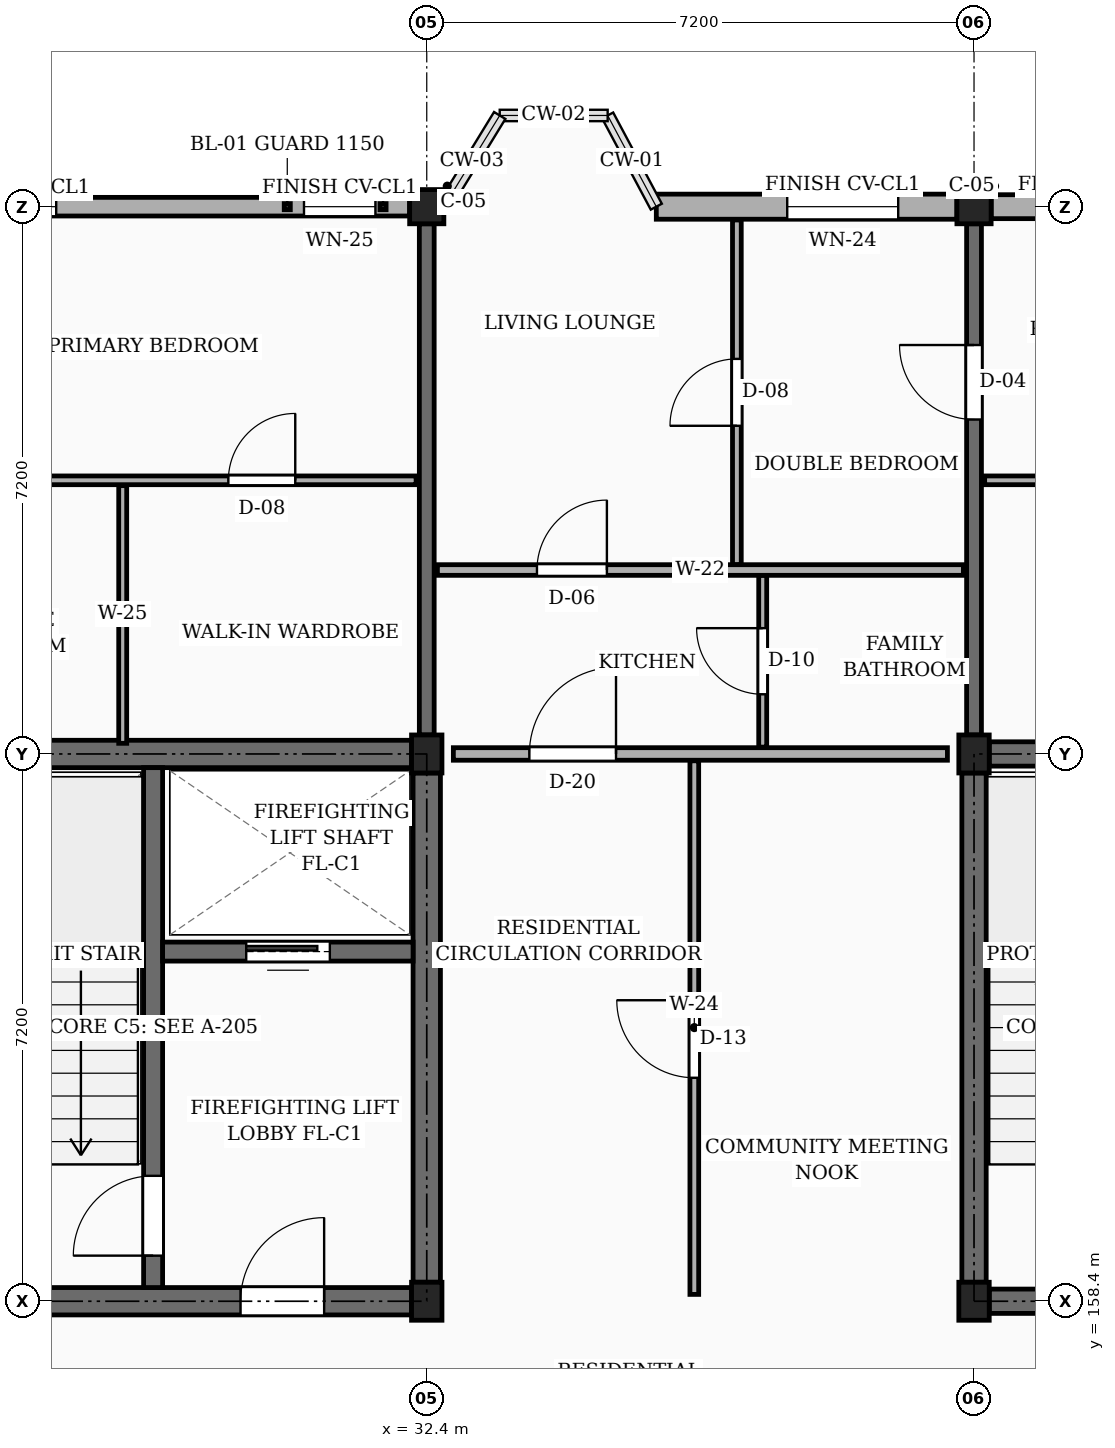
"""IFC4 building model, lengths in metres.
Left out: names, types, materials, properties, quantities, classifications, styles, units other than length and angle.
Written with IfcOpenShell. Run it as: python <this file> out.ifc"""

import sys

from ifc_helpers import new_model, si_unit, direction, frame, frame_2d, origin, origin_2d, place, context, subcontext, project, spatial, rectangle, extrude, element, fill, save


model = new_model("IFC4")
c1 = context("Model", 3, precision=1e-05, world=origin(), true_north=direction((0.0, 1.0)))
c2 = subcontext(c1, "Body", "Model", "MODEL_VIEW")
j1 = project(units=[si_unit("LENGTHUNIT", "METRE"), si_unit("PLANEANGLEUNIT", "RADIAN")], contexts=[c1])
p1 = place(None, origin())
s1 = spatial("IfcSite", under=j1, at=p1, CompositionType="ELEMENT")
p2 = place(p1, origin())
s2 = spatial("IfcBuilding", under=s1, at=p2, CompositionType="ELEMENT")
p3 = place(p2, frame((0.0, 0.0, 39.15)))
s3 = spatial("IfcBuildingStorey", under=s2, at=p3, CompositionType="ELEMENT", Elevation=39.15)
for number, where, z_axis, x_axis in (
    (1, (32.4, 158.4, 0.0), (0.0, 0.0, 1.0), (1.0, 0.0, 0.0)),
    (2, (32.4, 165.6, 0.0), (0.0, 0.0, 1.0), (1.0, 0.0, 0.0)),
):
    element("IfcColumn", number, at=place(p3, frame(where, z_axis=z_axis, x_axis=x_axis)), inside=s3, PredefinedType="COLUMN", context=c2, shape_type="SweptSolid", body=[
        extrude(rectangle(XDim=0.4, YDim=0.5, at=origin_2d()), origin(), (0.0, 0.0, 1.0), 3.15),
    ])
p4 = place(p3, frame((32.4, 172.8, 0.0), z_axis=(0.0, 0.0, 1.0), x_axis=(1.0, 0.0, 0.0)))
e3 = element("IfcColumn", 3, at=p4, inside=s3, PredefinedType="COLUMN", context=c2, shape_type="SweptSolid", body=[
    extrude(rectangle(XDim=0.45, YDim=0.45, at=origin_2d()), origin(), (0.0, 0.0, 1.0), 3.15),
])
for number, where, z_axis, x_axis in (
    (4, (39.6, 158.4, 0.0), (0.0, 0.0, 1.0), (1.0, 0.0, 0.0)),
    (5, (39.6, 165.6, 0.0), (0.0, 0.0, 1.0), (1.0, 0.0, 0.0)),
):
    element("IfcColumn", number, at=place(p3, frame(where, z_axis=z_axis, x_axis=x_axis)), inside=s3, PredefinedType="COLUMN", context=c2, shape_type="SweptSolid", body=[
        extrude(rectangle(XDim=0.4, YDim=0.5, at=origin_2d()), origin(), (0.0, 0.0, 1.0), 3.15),
    ])
p5 = place(p3, frame((39.6, 172.8, 0.0), z_axis=(0.0, 0.0, 1.0), x_axis=(1.0, 0.0, 0.0)))
e6 = element("IfcColumn", 6, at=p5, inside=s3, PredefinedType="COLUMN", context=c2, shape_type="SweptSolid", body=[
    extrude(rectangle(XDim=0.45, YDim=0.45, at=origin_2d()), origin(), (0.0, 0.0, 1.0), 3.15),
])
p6 = place(p3, frame((32.4, 165.85, 0.0), z_axis=(0.0, 0.0, 1.0), x_axis=(0.0, 1.0, 0.0)))
e7 = element("IfcWall", 7, at=p6, inside=s3, PredefinedType="SOLIDWALL", context=c2, shape_type="SweptSolid", body=[
    extrude(rectangle(XDim=6.725, YDim=0.195, at=frame_2d((3.362, 0.0))), origin(), (0.0, 0.0, 1.0), 2.185),
])
p7 = place(p3, frame((39.6, 165.85, 0.0), z_axis=(0.0, 0.0, 1.0), x_axis=(0.0, 1.0, 0.0)))
e8 = element("IfcWall", 8, at=p7, inside=s3, PredefinedType="SOLIDWALL", context=c2, shape_type="SweptSolid", body=[
    extrude(rectangle(XDim=6.725, YDim=0.195, at=frame_2d((3.362, 0.0))), origin(), (0.0, 0.0, 1.0), 2.185),
])
p8 = place(p7, frame((4.15, 0.0, 0.0)))
e9 = element("IfcOpeningElement", 9, at=p8, cuts=e8, PredefinedType="OPENING", context=c2, shape_type="SweptSolid", body=[
    extrude(rectangle(XDim=0.98, YDim=2.12, at=frame_2d((0.49, 1.06))), frame((0.0, 0.107, 0.0), z_axis=(0.0, -1.0, 0.0), x_axis=(1.0, 0.0, 0.0)), (0.0, 0.0, 1.0), 0.215),
])
p9 = place(p3, frame((46.575, 172.8, 0.0), z_axis=(0.0, 0.0, 1.0), x_axis=(-1.0, 0.0, 0.0)))
e10 = element("IfcWall", 10, at=p9, inside=s3, PredefinedType="SOLIDWALL", context=c2, shape_type="SweptSolid", body=[
    extrude(rectangle(XDim=6.75, YDim=0.315, at=frame_2d((3.375, 0.0))), origin(), (0.0, 0.0, 1.0), 2.455),
])
p10 = place(p9, frame((0.45, 0.0, 0.78)))
e11 = element("IfcOpeningElement", 11, at=p10, cuts=e10, PredefinedType="OPENING", context=c2, shape_type="SweptSolid", body=[
    extrude(rectangle(XDim=1.3, YDim=1.36, at=frame_2d((0.65, 0.68))), frame((0.0, 0.167, 0.0), z_axis=(0.0, -1.0, 0.0), x_axis=(1.0, 0.0, 0.0)), (0.0, 0.0, 1.0), 0.335),
])
p11 = place(p9, frame((4.65, 0.0, 0.78)))
e12 = element("IfcOpeningElement", 12, at=p11, cuts=e10, PredefinedType="OPENING", context=c2, shape_type="SweptSolid", body=[
    extrude(rectangle(XDim=1.46, YDim=1.36, at=frame_2d((0.73, 0.68))), frame((0.0, 0.167, 0.0), z_axis=(0.0, -1.0, 0.0), x_axis=(1.0, 0.0, 0.0)), (0.0, 0.0, 1.0), 0.335),
])
p12 = place(p3, frame((39.375, 172.8, 0.0), z_axis=(0.0, 0.0, 1.0), x_axis=(-1.0, 0.0, 0.0)))
e13 = element("IfcWall", 13, at=p12, inside=s3, PredefinedType="SOLIDWALL", context=c2, shape_type="SweptSolid", body=[
    extrude(rectangle(XDim=3.955, YDim=0.33, at=frame_2d((1.978, 0.0))), origin(), (0.0, 0.0, 1.0), 2.455),
])
p13 = place(p12, frame((0.772, 0.0, 0.78)))
e14 = element("IfcOpeningElement", 14, at=p13, cuts=e13, PredefinedType="OPENING", context=c2, shape_type="SweptSolid", body=[
    extrude(rectangle(XDim=1.46, YDim=1.36, at=frame_2d((0.73, 0.68))), frame((0.0, 0.175, 0.0), z_axis=(0.0, -1.0, 0.0), x_axis=(1.0, 0.0, 0.0)), (0.0, 0.0, 1.0), 0.35),
])
p14 = place(p3, frame((32.175, 172.8, 0.0), z_axis=(0.0, 0.0, 1.0), x_axis=(-1.0, 0.0, 0.0)))
e15 = element("IfcWall", 15, at=p14, inside=s3, PredefinedType="SOLIDWALL", context=c2, shape_type="SweptSolid", body=[
    extrude(rectangle(XDim=6.75, YDim=0.245, at=frame_2d((3.375, 0.0))), origin(), (0.0, 0.0, 1.0), 2.455),
])
p15 = place(p14, frame((0.45, 0.0, 0.78)))
e16 = element("IfcOpeningElement", 16, at=p15, cuts=e15, PredefinedType="OPENING", context=c2, shape_type="SweptSolid", body=[
    extrude(rectangle(XDim=0.94, YDim=1.44, at=frame_2d((0.47, 0.72))), frame((0.0, 0.133, 0.0), z_axis=(0.0, -1.0, 0.0), x_axis=(1.0, 0.0, 0.0)), (0.0, 0.0, 1.0), 0.265),
])
p16 = place(p14, frame((4.65, 0.0, 0.78)))
e17 = element("IfcOpeningElement", 17, at=p16, cuts=e15, PredefinedType="OPENING", context=c2, shape_type="SweptSolid", body=[
    extrude(rectangle(XDim=1.15, YDim=1.44, at=frame_2d((0.575, 0.72))), frame((0.0, 0.133, 0.0), z_axis=(0.0, -1.0, 0.0), x_axis=(1.0, 0.0, 0.0)), (0.0, 0.0, 1.0), 0.265),
])
p17 = place(p3, frame((25.4, 165.6, 0.0), z_axis=(0.0, 0.0, 1.0), x_axis=(1.0, 0.0, 0.0)))
e18 = element("IfcWall", 18, at=p17, inside=s3, PredefinedType="SHEAR", context=c2, shape_type="SweptSolid", body=[
    extrude(rectangle(XDim=6.8, YDim=0.36, at=frame_2d((3.4, 0.0))), origin(), (0.0, 0.0, 1.0), 2.885),
])
p18 = place(p3, frame((32.4, 158.65, 0.0), z_axis=(0.0, 0.0, 1.0), x_axis=(0.0, 1.0, 0.0)))
e19 = element("IfcWall", 19, at=p18, inside=s3, PredefinedType="SHEAR", context=c2, shape_type="SweptSolid", body=[
    extrude(rectangle(XDim=6.7, YDim=0.36, at=frame_2d((3.35, 0.0))), origin(), (0.0, 0.0, 1.0), 2.885),
])
p19 = place(p3, frame((25.4, 158.4, 0.0), z_axis=(0.0, 0.0, 1.0), x_axis=(1.0, 0.0, 0.0)))
e20 = element("IfcWall", 20, at=p19, inside=s3, PredefinedType="SHEAR", context=c2, shape_type="SweptSolid", body=[
    extrude(rectangle(XDim=6.8, YDim=0.36, at=frame_2d((3.4, 0.0))), origin(), (0.0, 0.0, 1.0), 2.885),
])
p20 = place(p19, frame((4.55, 0.0, 0.0)))
e21 = element("IfcOpeningElement", 21, at=p20, cuts=e20, PredefinedType="OPENING", context=c2, shape_type="SweptSolid", body=[
    extrude(rectangle(XDim=1.1, YDim=2.15, at=frame_2d((0.55, 1.075))), frame((0.0, 0.19, 0.0), z_axis=(0.0, -1.0, 0.0), x_axis=(1.0, 0.0, 0.0)), (0.0, 0.0, 1.0), 0.38),
])
p21 = place(p3, frame((28.8, 158.58, 0.0), z_axis=(0.0, 0.0, 1.0), x_axis=(0.0, 1.0, 0.0)))
e22 = element("IfcWall", 22, at=p21, inside=s3, PredefinedType="SHEAR", context=c2, shape_type="SweptSolid", body=[
    extrude(rectangle(XDim=6.84, YDim=0.25, at=frame_2d((3.42, 0.0))), origin(), (0.0, 0.0, 1.0), 2.885),
])
p22 = place(p21, frame((0.42, 0.0, 0.0)))
e23 = element("IfcOpeningElement", 23, at=p22, cuts=e22, PredefinedType="OPENING", context=c2, shape_type="SweptSolid", body=[
    extrude(rectangle(XDim=1.05, YDim=2.15, at=frame_2d((0.525, 1.075))), frame((0.0, 0.135, 0.0), z_axis=(0.0, -1.0, 0.0), x_axis=(1.0, 0.0, 0.0)), (0.0, 0.0, 1.0), 0.27),
])
p23 = place(p3, frame((28.925, 163.0, 0.0), z_axis=(0.0, 0.0, 1.0), x_axis=(1.0, 0.0, 0.0)))
e24 = element("IfcWall", 24, at=p23, inside=s3, PredefinedType="SHEAR", context=c2, shape_type="SweptSolid", body=[
    extrude(rectangle(XDim=3.295, YDim=0.25, at=frame_2d((1.647, 0.0))), origin(), (0.0, 0.0, 1.0), 2.885),
])
p24 = place(p23, frame((1.1, 0.0, 0.0)))
e25 = element("IfcOpeningElement", 25, at=p24, cuts=e24, PredefinedType="OPENING", context=c2, shape_type="SweptSolid", body=[
    extrude(rectangle(XDim=1.1, YDim=2.2, at=frame_2d((0.55, 1.1))), frame((0.0, 0.135, 0.0), z_axis=(0.0, -1.0, 0.0), x_axis=(1.0, 0.0, 0.0)), (0.0, 0.0, 1.0), 0.27),
])
p25 = place(p3, frame((39.6, 158.65, 0.0), z_axis=(0.0, 0.0, 1.0), x_axis=(0.0, 1.0, 0.0)))
e26 = element("IfcWall", 26, at=p25, inside=s3, PredefinedType="SHEAR", context=c2, shape_type="SweptSolid", body=[
    extrude(rectangle(XDim=6.7, YDim=0.32, at=frame_2d((3.35, 0.0))), origin(), (0.0, 0.0, 1.0), 2.885),
])
p26 = place(p3, frame((39.8, 165.6, 0.0), z_axis=(0.0, 0.0, 1.0), x_axis=(1.0, 0.0, 0.0)))
e27 = element("IfcWall", 27, at=p26, inside=s3, PredefinedType="SHEAR", context=c2, shape_type="SweptSolid", body=[
    extrude(rectangle(XDim=6.8, YDim=0.32, at=frame_2d((3.4, 0.0))), origin(), (0.0, 0.0, 1.0), 2.885),
])
p27 = place(p3, frame((39.8, 158.4, 0.0), z_axis=(0.0, 0.0, 1.0), x_axis=(1.0, 0.0, 0.0)))
e28 = element("IfcWall", 28, at=p27, inside=s3, PredefinedType="SHEAR", context=c2, shape_type="SweptSolid", body=[
    extrude(rectangle(XDim=6.8, YDim=0.32, at=frame_2d((3.4, 0.0))), origin(), (0.0, 0.0, 1.0), 2.885),
])
p28 = place(p27, frame((4.55, 0.0, 0.0)))
e29 = element("IfcOpeningElement", 29, at=p28, cuts=e28, PredefinedType="OPENING", context=c2, shape_type="SweptSolid", body=[
    extrude(rectangle(XDim=1.1, YDim=2.15, at=frame_2d((0.55, 1.075))), frame((0.0, 0.17, 0.0), z_axis=(0.0, -1.0, 0.0), x_axis=(1.0, 0.0, 0.0)), (0.0, 0.0, 1.0), 0.34),
])
p29 = place(p3, frame((32.75, 165.6, 0.0), z_axis=(0.0, 0.0, 1.0), x_axis=(1.0, 0.0, 0.0)))
e30 = element("IfcWall", 30, at=p29, inside=s3, PredefinedType="PARTITIONING", context=c2, shape_type="SweptSolid", body=[
    extrude(rectangle(XDim=6.5, YDim=0.165, at=frame_2d((3.25, 0.0))), origin(), (0.0, 0.0, 1.0), 2.32),
])
p30 = place(p29, frame((1.0, 0.0, 0.0)))
e31 = element("IfcOpeningElement", 31, at=p30, cuts=e30, PredefinedType="OPENING", context=c2, shape_type="SweptSolid", body=[
    extrude(rectangle(XDim=1.14, YDim=2.18, at=frame_2d((0.57, 1.09))), frame((0.0, 0.093, 0.0), z_axis=(0.0, -1.0, 0.0), x_axis=(1.0, 0.0, 0.0)), (0.0, 0.0, 1.0), 0.185),
])
p31 = place(p3, frame((25.34, 169.2, 0.0), z_axis=(0.0, 0.0, 1.0), x_axis=(1.0, 0.0, 0.0)))
e32 = element("IfcWall", 32, at=p31, inside=s3, PredefinedType="PARTITIONING", context=c2, shape_type="SweptSolid", body=[
    extrude(rectangle(XDim=6.92, YDim=0.115, at=frame_2d((3.46, 0.0))), origin(), (0.0, 0.0, 1.0), 2.32),
])
p32 = place(p31, frame((1.05, 0.0, 0.0)))
e33 = element("IfcOpeningElement", 33, at=p32, cuts=e32, PredefinedType="OPENING", context=c2, shape_type="SweptSolid", body=[
    extrude(rectangle(XDim=0.87, YDim=2.05, at=frame_2d((0.435, 1.025))), frame((0.0, 0.067, 0.0), z_axis=(0.0, -1.0, 0.0), x_axis=(1.0, 0.0, 0.0)), (0.0, 0.0, 1.0), 0.135),
])
p33 = place(p31, frame((4.45, 0.0, 0.0)))
e34 = element("IfcOpeningElement", 34, at=p33, cuts=e32, PredefinedType="OPENING", context=c2, shape_type="SweptSolid", body=[
    extrude(rectangle(XDim=0.88, YDim=2.08, at=frame_2d((0.44, 1.04))), frame((0.0, 0.067, 0.0), z_axis=(0.0, -1.0, 0.0), x_axis=(1.0, 0.0, 0.0)), (0.0, 0.0, 1.0), 0.135),
])
p34 = place(p3, frame((28.4, 165.74, 0.0), z_axis=(0.0, 0.0, 1.0), x_axis=(0.0, 1.0, 0.0)))
e35 = element("IfcWall", 35, at=p34, inside=s3, PredefinedType="PARTITIONING", context=c2, shape_type="SweptSolid", body=[
    extrude(rectangle(XDim=3.39, YDim=0.105, at=frame_2d((1.695, 0.0))), origin(), (0.0, 0.0, 1.0), 2.32),
])
p35 = place(p3, frame((35.92, 158.49, 0.0), z_axis=(0.0, 0.0, 1.0), x_axis=(0.0, 1.0, 0.0)))
e36 = element("IfcWall", 36, at=p35, inside=s3, PredefinedType="PARTITIONING", context=c2, shape_type="SweptSolid", body=[
    extrude(rectangle(XDim=7.02, YDim=0.115, at=frame_2d((3.51, 0.0))), origin(), (0.0, 0.0, 1.0), 2.32),
])
p36 = place(p35, frame((2.85, 0.0, 0.0)))
e37 = element("IfcOpeningElement", 37, at=p36, cuts=e36, PredefinedType="OPENING", context=c2, shape_type="SweptSolid", body=[
    extrude(rectangle(XDim=1.02, YDim=2.15, at=frame_2d((0.51, 1.075))), frame((0.0, 0.067, 0.0), z_axis=(0.0, -1.0, 0.0), x_axis=(1.0, 0.0, 0.0)), (0.0, 0.0, 1.0), 0.135),
])
p37 = place(p3, frame((36.48, 168.09, 0.0), z_axis=(0.0, 0.0, 1.0), x_axis=(0.0, 1.0, 0.0)))
e38 = element("IfcWall", 38, at=p37, inside=s3, PredefinedType="PARTITIONING", context=c2, shape_type="SweptSolid", body=[
    extrude(rectangle(XDim=4.535, YDim=0.115, at=frame_2d((2.268, 0.0))), origin(), (0.0, 0.0, 1.0), 2.32),
])
p38 = place(p37, frame((1.827, 0.0, 0.0)))
e39 = element("IfcOpeningElement", 39, at=p38, cuts=e38, PredefinedType="OPENING", context=c2, shape_type="SweptSolid", body=[
    extrude(rectangle(XDim=0.88, YDim=2.08, at=frame_2d((0.44, 1.04))), frame((0.0, 0.067, 0.0), z_axis=(0.0, -1.0, 0.0), x_axis=(1.0, 0.0, 0.0)), (0.0, 0.0, 1.0), 0.135),
])
p39 = place(p3, frame((36.82, 165.69, 0.0), z_axis=(0.0, 0.0, 1.0), x_axis=(0.0, 1.0, 0.0)))
e40 = element("IfcWall", 40, at=p39, inside=s3, PredefinedType="PARTITIONING", context=c2, shape_type="SweptSolid", body=[
    extrude(rectangle(XDim=2.26, YDim=0.105, at=frame_2d((1.13, 0.0))), origin(), (0.0, 0.0, 1.0), 2.32),
])
p40 = place(p39, frame((0.695, 0.0, 0.0)))
e41 = element("IfcOpeningElement", 41, at=p40, cuts=e40, PredefinedType="OPENING", context=c2, shape_type="SweptSolid", body=[
    extrude(rectangle(XDim=0.87, YDim=2.05, at=frame_2d((0.435, 1.025))), frame((0.0, 0.062, 0.0), z_axis=(0.0, -1.0, 0.0), x_axis=(1.0, 0.0, 0.0)), (0.0, 0.0, 1.0), 0.125),
])
p41 = place(p3, frame((32.54, 168.02, 0.0), z_axis=(0.0, 0.0, 1.0), x_axis=(1.0, 0.0, 0.0)))
e42 = element("IfcWall", 42, at=p41, inside=s3, PredefinedType="PARTITIONING", context=c2, shape_type="SweptSolid", body=[
    extrude(rectangle(XDim=6.92, YDim=0.14, at=frame_2d((3.46, 0.0))), origin(), (0.0, 0.0, 1.0), 2.32),
])
p42 = place(p41, frame((1.31, 0.0, 0.0)))
e43 = element("IfcOpeningElement", 43, at=p42, cuts=e42, PredefinedType="OPENING", context=c2, shape_type="SweptSolid", body=[
    extrude(rectangle(XDim=0.92, YDim=2.1, at=frame_2d((0.46, 1.05))), frame((0.0, 0.08, 0.0), z_axis=(0.0, -1.0, 0.0), x_axis=(1.0, 0.0, 0.0)), (0.0, 0.0, 1.0), 0.16),
])
p43 = place(p3, frame((39.74, 169.2, 0.0), z_axis=(0.0, 0.0, 1.0), x_axis=(1.0, 0.0, 0.0)))
e44 = element("IfcWall", 44, at=p43, inside=s3, PredefinedType="PARTITIONING", context=c2, shape_type="SweptSolid", body=[
    extrude(rectangle(XDim=6.92, YDim=0.115, at=frame_2d((3.46, 0.0))), origin(), (0.0, 0.0, 1.0), 2.32),
])
p44 = place(p43, frame((1.05, 0.0, 0.0)))
e45 = element("IfcOpeningElement", 45, at=p44, cuts=e44, PredefinedType="OPENING", context=c2, shape_type="SweptSolid", body=[
    extrude(rectangle(XDim=0.87, YDim=2.05, at=frame_2d((0.435, 1.025))), frame((0.0, 0.067, 0.0), z_axis=(0.0, -1.0, 0.0), x_axis=(1.0, 0.0, 0.0)), (0.0, 0.0, 1.0), 0.135),
])
p45 = place(p43, frame((4.45, 0.0, 0.0)))
e46 = element("IfcOpeningElement", 46, at=p45, cuts=e44, PredefinedType="OPENING", context=c2, shape_type="SweptSolid", body=[
    extrude(rectangle(XDim=0.88, YDim=2.08, at=frame_2d((0.44, 1.04))), frame((0.0, 0.067, 0.0), z_axis=(0.0, -1.0, 0.0), x_axis=(1.0, 0.0, 0.0)), (0.0, 0.0, 1.0), 0.135),
])
p46 = place(p13, origin())
e47 = element("IfcWindow", 47, at=p46, inside=s3, PartitioningType="SINGLE_PANEL", PredefinedType="WINDOW", context=c2, shape_type="SweptSolid", body=[
    extrude(rectangle(XDim=1.46, YDim=1.36, at=frame_2d((0.73, 0.68))), frame((0.0, 0.03, 0.0), z_axis=(0.0, -1.0, 0.0), x_axis=(1.0, 0.0, 0.0)), (0.0, 0.0, 1.0), 0.06),
])
fill(e14, e47)
p47 = place(p15, origin())
e48 = element("IfcWindow", 48, at=p47, inside=s3, PartitioningType="SINGLE_PANEL", PredefinedType="WINDOW", context=c2, shape_type="SweptSolid", body=[
    extrude(rectangle(XDim=0.94, YDim=1.44, at=frame_2d((0.47, 0.72))), frame((0.0, 0.03, 0.0), z_axis=(0.0, -1.0, 0.0), x_axis=(1.0, 0.0, 0.0)), (0.0, 0.0, 1.0), 0.06),
])
fill(e16, e48)
p48 = place(p16, origin())
e49 = element("IfcWindow", 49, at=p48, inside=s3, PartitioningType="SINGLE_PANEL", PredefinedType="WINDOW", context=c2, shape_type="SweptSolid", body=[
    extrude(rectangle(XDim=1.15, YDim=1.44, at=frame_2d((0.575, 0.72))), frame((0.0, 0.03, 0.0), z_axis=(0.0, -1.0, 0.0), x_axis=(1.0, 0.0, 0.0)), (0.0, 0.0, 1.0), 0.06),
])
fill(e17, e49)
p49 = place(p20, frame((1.1, 0.0, 0.0), z_axis=(0.0, 0.0, 1.0), x_axis=(-1.0, 0.0, 0.0)))
e50 = element("IfcDoor", 50, at=p49, inside=s3, OperationType="SINGLE_SWING_RIGHT", PredefinedType="DOOR", context=c2, shape_type="SweptSolid", body=[
    extrude(rectangle(XDim=1.1, YDim=2.15, at=frame_2d((0.55, 1.075))), frame((0.0, 0.025, 0.0), z_axis=(0.0, -1.0, 0.0), x_axis=(1.0, 0.0, 0.0)), (0.0, 0.0, 1.0), 0.05),
])
fill(e21, e50)
p50 = place(p22, origin())
e51 = element("IfcDoor", 51, at=p50, inside=s3, OperationType="SINGLE_SWING_LEFT", PredefinedType="DOOR", context=c2, shape_type="SweptSolid", body=[
    extrude(rectangle(XDim=1.05, YDim=2.15, at=frame_2d((0.525, 1.075))), frame((0.0, 0.025, 0.0), z_axis=(0.0, -1.0, 0.0), x_axis=(1.0, 0.0, 0.0)), (0.0, 0.0, 1.0), 0.05),
])
fill(e23, e51)
p51 = place(p24, origin())
e52 = element("IfcDoor", 52, at=p51, inside=s3, OperationType="SLIDING_TO_LEFT", PredefinedType="DOOR", context=c2, shape_type="SweptSolid", body=[
    extrude(rectangle(XDim=1.1, YDim=2.2, at=frame_2d((0.55, 1.1))), frame((0.0, 0.025, 0.0), z_axis=(0.0, -1.0, 0.0), x_axis=(1.0, 0.0, 0.0)), (0.0, 0.0, 1.0), 0.05),
])
fill(e25, e52)
p52 = place(p30, origin())
e53 = element("IfcDoor", 53, at=p52, inside=s3, OperationType="SINGLE_SWING_RIGHT", PredefinedType="DOOR", context=c2, shape_type="SweptSolid", body=[
    extrude(rectangle(XDim=1.14, YDim=2.18, at=frame_2d((0.57, 1.09))), frame((0.0, 0.025, 0.0), z_axis=(0.0, -1.0, 0.0), x_axis=(1.0, 0.0, 0.0)), (0.0, 0.0, 1.0), 0.05),
])
fill(e31, e53)
p53 = place(p33, origin())
e54 = element("IfcDoor", 54, at=p53, inside=s3, OperationType="SINGLE_SWING_RIGHT", PredefinedType="DOOR", context=c2, shape_type="SweptSolid", body=[
    extrude(rectangle(XDim=0.88, YDim=2.08, at=frame_2d((0.44, 1.04))), frame((0.0, 0.025, 0.0), z_axis=(0.0, -1.0, 0.0), x_axis=(1.0, 0.0, 0.0)), (0.0, 0.0, 1.0), 0.05),
])
fill(e34, e54)
p54 = place(p36, origin())
e55 = element("IfcDoor", 55, at=p54, inside=s3, OperationType="SINGLE_SWING_RIGHT", PredefinedType="DOOR", context=c2, shape_type="SweptSolid", body=[
    extrude(rectangle(XDim=1.02, YDim=2.15, at=frame_2d((0.51, 1.075))), frame((0.0, 0.025, 0.0), z_axis=(0.0, -1.0, 0.0), x_axis=(1.0, 0.0, 0.0)), (0.0, 0.0, 1.0), 0.05),
])
fill(e37, e55)
p55 = place(p38, origin())
e56 = element("IfcDoor", 56, at=p55, inside=s3, OperationType="SINGLE_SWING_LEFT", PredefinedType="DOOR", context=c2, shape_type="SweptSolid", body=[
    extrude(rectangle(XDim=0.88, YDim=2.08, at=frame_2d((0.44, 1.04))), frame((0.0, 0.025, 0.0), z_axis=(0.0, -1.0, 0.0), x_axis=(1.0, 0.0, 0.0)), (0.0, 0.0, 1.0), 0.05),
])
fill(e39, e56)
p56 = place(p40, origin())
e57 = element("IfcDoor", 57, at=p56, inside=s3, OperationType="SINGLE_SWING_RIGHT", PredefinedType="DOOR", context=c2, shape_type="SweptSolid", body=[
    extrude(rectangle(XDim=0.87, YDim=2.05, at=frame_2d((0.435, 1.025))), frame((0.0, 0.025, 0.0), z_axis=(0.0, -1.0, 0.0), x_axis=(1.0, 0.0, 0.0)), (0.0, 0.0, 1.0), 0.05),
])
fill(e41, e57)
p57 = place(p42, origin())
e58 = element("IfcDoor", 58, at=p57, inside=s3, OperationType="SINGLE_SWING_RIGHT", PredefinedType="DOOR", context=c2, shape_type="SweptSolid", body=[
    extrude(rectangle(XDim=0.92, YDim=2.1, at=frame_2d((0.46, 1.05))), frame((0.0, 0.025, 0.0), z_axis=(0.0, -1.0, 0.0), x_axis=(1.0, 0.0, 0.0)), (0.0, 0.0, 1.0), 0.05),
])
fill(e43, e58)
p58 = place(p8, origin())
e59 = element("IfcDoor", 59, at=p58, inside=s3, OperationType="SINGLE_SWING_RIGHT", PredefinedType="DOOR", context=c2, shape_type="SweptSolid", body=[
    extrude(rectangle(XDim=0.98, YDim=2.12, at=frame_2d((0.49, 1.06))), frame((0.0, 0.025, 0.0), z_axis=(0.0, -1.0, 0.0), x_axis=(1.0, 0.0, 0.0)), (0.0, 0.0, 1.0), 0.05),
])
fill(e9, e59)
save(model, sys.argv[1])
